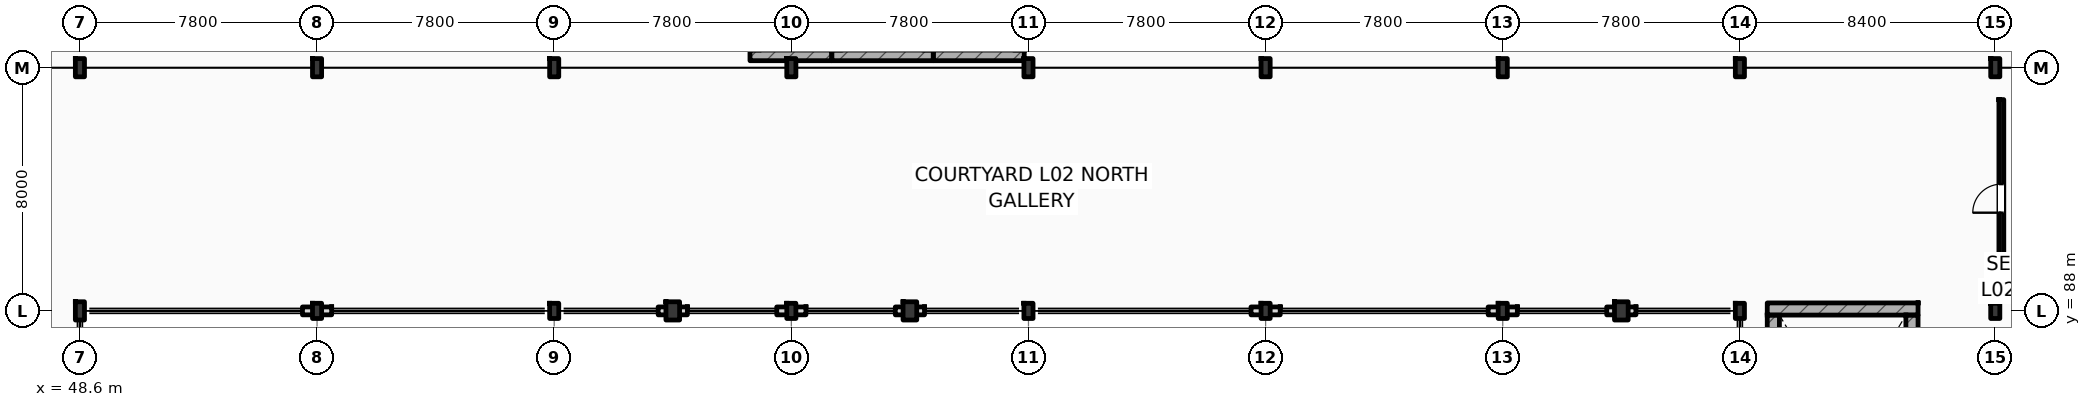
"""IFC4 building model, lengths in metres.
Left out: names, types, materials, properties, quantities, classifications, styles, units other than length and angle.
Written with IfcOpenShell. Run it as: python <this file> out.ifc"""

import sys

from ifc_helpers import new_model, si_unit, direction, frame, frame_2d, origin, origin_2d, place, context, subcontext, project, spatial, rectangle, i_section, extrude, element, fill, save


model = new_model("IFC4")
c1 = context("Model", 3, precision=1e-05, world=origin(), true_north=direction((0.0, 1.0)))
c2 = subcontext(c1, "Body", "Model", "MODEL_VIEW")
j1 = project(units=[si_unit("LENGTHUNIT", "METRE"), si_unit("PLANEANGLEUNIT", "RADIAN")], contexts=[c1])
p1 = place(None, origin())
s1 = spatial("IfcSite", under=j1, at=p1, CompositionType="ELEMENT")
p2 = place(p1, origin())
s2 = spatial("IfcBuilding", under=s1, at=p2, CompositionType="ELEMENT")
p3 = place(p2, frame((0.0, 0.0, 11.4)))
s3 = spatial("IfcBuildingStorey", under=s2, at=p3, CompositionType="ELEMENT", Elevation=11.4)
for number, where, z_axis, x_axis in (
    (1, (48.6, 96.0, 0.0), (0.0, 0.0, 1.0), (1.0, 0.0, 0.0)),
    (2, (56.4, 96.0, 0.0), (0.0, 0.0, 1.0), (1.0, 0.0, 0.0)),
    (3, (64.2, 96.0, 0.0), (0.0, 0.0, 1.0), (1.0, 0.0, 0.0)),
    (4, (72.0, 96.0, 0.0), (0.0, 0.0, 1.0), (1.0, 0.0, 0.0)),
    (5, (79.8, 96.0, 0.0), (0.0, 0.0, 1.0), (1.0, 0.0, 0.0)),
    (6, (87.6, 96.0, 0.0), (0.0, 0.0, 1.0), (1.0, 0.0, 0.0)),
    (7, (95.4, 96.0, 0.0), (0.0, 0.0, 1.0), (1.0, 0.0, 0.0)),
    (8, (103.2, 96.0, 0.0), (0.0, 0.0, 1.0), (1.0, 0.0, 0.0)),
    (9, (111.6, 96.0, 0.0), (0.0, 0.0, 1.0), (1.0, 0.0, 0.0)),
    (10, (48.6, 88.0, 0.0), (0.0, 0.0, 1.0), (1.0, 0.0, 0.0)),
):
    element("IfcColumn", number, at=place(p3, frame(where, z_axis=z_axis, x_axis=x_axis)), inside=s3, PredefinedType="COLUMN", context=c2, shape_type="SweptSolid", body=[
        extrude(i_section(OverallWidth=0.3, OverallDepth=0.6, WebThickness=0.015, FlangeThickness=0.03, FilletRadius=0.027, at=origin_2d()), origin(), (0.0, 0.0, 1.0), 4.8),
    ])
for number, where, z_axis, x_axis in (
    (11, (56.4, 88.0, 0.0), (0.0, 0.0, 1.0), (1.0, 0.0, 0.0)),
    (12, (64.2, 88.0, 0.0), (0.0, 0.0, 1.0), (1.0, 0.0, 0.0)),
    (13, (72.0, 88.0, 0.0), (0.0, 0.0, 1.0), (1.0, 0.0, 0.0)),
    (14, (79.8, 88.0, 0.0), (0.0, 0.0, 1.0), (1.0, 0.0, 0.0)),
    (15, (87.6, 88.0, 0.0), (0.0, 0.0, 1.0), (1.0, 0.0, 0.0)),
    (16, (95.4, 88.0, 0.0), (0.0, 0.0, 1.0), (1.0, 0.0, 0.0)),
    (17, (103.2, 88.0, 0.0), (0.0, 0.0, 1.0), (1.0, 0.0, 0.0)),
    (18, (111.6, 88.0, 0.0), (0.0, 0.0, 1.0), (1.0, 0.0, 0.0)),
):
    element("IfcColumn", number, at=place(p3, frame(where, z_axis=z_axis, x_axis=x_axis)), inside=s3, PredefinedType="COLUMN", context=c2, shape_type="SweptSolid", body=[
        extrude(i_section(OverallWidth=0.3, OverallDepth=0.5, WebThickness=0.014, FlangeThickness=0.028, FilletRadius=0.027, at=origin_2d()), origin(), (0.0, 0.0, 1.0), 4.8),
    ])
for number, where, z_axis, x_axis in (
    (19, (68.1, 88.0, 0.0), (0.0, 0.0, 1.0), (1.0, 0.0, 0.0)),
    (20, (75.9, 88.0, 0.0), (0.0, 0.0, 1.0), (1.0, 0.0, 0.0)),
    (21, (99.3, 88.0, 0.0), (0.0, 0.0, 1.0), (1.0, 0.0, 0.0)),
):
    element("IfcColumn", number, at=place(p3, frame(where, z_axis=z_axis, x_axis=x_axis)), inside=s3, PredefinedType="PILASTER", context=c2, shape_type="SweptSolid", body=[
        extrude(rectangle(XDim=0.45, YDim=0.6, at=origin_2d()), origin(), (0.0, 0.0, 1.0), 4.8),
    ])
p4 = place(p3, frame((104.1, 88.062, 0.0), z_axis=(0.0, 0.0, 1.0), x_axis=(1.0, 0.0, 0.0)))
e22 = element("IfcWall", 22, at=p4, inside=s3, PredefinedType="SHEAR", context=c2, shape_type="SweptSolid", body=[
    extrude(rectangle(XDim=4.96, YDim=0.4, at=frame_2d((2.48, 0.0))), origin(), (0.0, 0.0, 1.0), 4.8),
])
p5 = place(p3, frame((104.3, 78.75, 0.0), z_axis=(0.0, 0.0, 1.0), x_axis=(0.0, 1.0, 0.0)))
e23 = element("IfcWall", 23, at=p5, inside=s3, PredefinedType="SHEAR", context=c2, shape_type="SweptSolid", body=[
    extrude(rectangle(XDim=9.112, YDim=0.4, at=frame_2d((4.556, 0.0))), origin(), (0.0, 0.0, 1.0), 4.8),
])
p6 = place(p3, frame((108.86, 78.75, 0.0), z_axis=(0.0, 0.0, 1.0), x_axis=(0.0, 1.0, 0.0)))
e24 = element("IfcWall", 24, at=p6, inside=s3, PredefinedType="SHEAR", context=c2, shape_type="SweptSolid", body=[
    extrude(rectangle(XDim=9.112, YDim=0.4, at=frame_2d((4.556, 0.0))), origin(), (0.0, 0.0, 1.0), 4.8),
])
p7 = place(p6, frame((0.44, 0.0, 0.0)))
e25 = element("IfcOpeningElement", 25, at=p7, cuts=e24, PredefinedType="OPENING", context=c2, shape_type="SweptSolid", body=[
    extrude(rectangle(XDim=1.1, YDim=2.2, at=frame_2d((0.55, 1.1))), frame((0.0, 0.21, 0.0), z_axis=(0.0, -1.0, 0.0), x_axis=(1.0, 0.0, 0.0)), (0.0, 0.0, 1.0), 0.42),
])
for number, where, z_axis, x_axis in (
    (26, (55.92, 88.0, 0.0), (0.0, 0.0, 1.0), (1.0, 0.0, 0.0)),
    (27, (67.62, 88.0, 0.0), (0.0, 0.0, 1.0), (1.0, 0.0, 0.0)),
    (28, (71.52, 88.0, 0.0), (0.0, 0.0, 1.0), (1.0, 0.0, 0.0)),
    (29, (75.42, 88.0, 0.0), (0.0, 0.0, 1.0), (1.0, 0.0, 0.0)),
    (30, (87.12, 88.0, 0.0), (0.0, 0.0, 1.0), (1.0, 0.0, 0.0)),
    (31, (94.92, 88.0, 0.0), (0.0, 0.0, 1.0), (1.0, 0.0, 0.0)),
    (32, (98.82, 88.0, 0.0), (0.0, 0.0, 1.0), (1.0, 0.0, 0.0)),
):
    element("IfcWall", number, at=place(p3, frame(where, z_axis=z_axis, x_axis=x_axis)), inside=s3, PredefinedType="STANDARD", context=c2, shape_type="SweptSolid", body=[
        extrude(rectangle(XDim=0.96, YDim=0.26, at=frame_2d((0.48, 0.0))), origin(), (0.0, 0.0, 1.0), 4.06),
    ])
p8 = place(p3, frame((70.64, 96.405, 0.0), z_axis=(0.0, 0.0, 1.0), x_axis=(1.0, 0.0, 0.0)))
e33 = element("IfcWall", 33, at=p8, inside=s3, PredefinedType="SHEAR", context=c2, shape_type="SweptSolid", body=[
    extrude(rectangle(XDim=2.69, YDim=0.35, at=frame_2d((1.345, 0.0))), origin(), (0.0, 0.0, 1.0), 4.52),
])
p9 = place(p3, frame((73.33, 96.405, 0.0), z_axis=(0.0, 0.0, 1.0), x_axis=(1.0, 0.0, 0.0)))
e34 = element("IfcWall", 34, at=p9, inside=s3, PredefinedType="SHEAR", context=c2, shape_type="SweptSolid", body=[
    extrude(rectangle(XDim=3.34, YDim=0.35, at=frame_2d((1.67, 0.0))), origin(), (0.0, 0.0, 1.0), 4.52),
])
p10 = place(p3, frame((76.67, 96.405, 0.0), z_axis=(0.0, 0.0, 1.0), x_axis=(1.0, 0.0, 0.0)))
e35 = element("IfcWall", 35, at=p10, inside=s3, PredefinedType="SHEAR", context=c2, shape_type="SweptSolid", body=[
    extrude(rectangle(XDim=2.99, YDim=0.35, at=frame_2d((1.495, 0.0))), origin(), (0.0, 0.0, 1.0), 4.52),
])
p11 = place(p3, frame((111.8, 88.45, 0.0), z_axis=(0.0, 0.0, 1.0), x_axis=(0.0, 1.0, 0.0)))
e36 = element("IfcWall", 36, at=p11, inside=s3, PredefinedType="PARTITIONING", context=c2, shape_type="SweptSolid", body=[
    extrude(rectangle(XDim=6.5, YDim=0.16, at=frame_2d((3.25, 0.0))), origin(), (0.0, 0.0, 1.0), 4.11),
])
p12 = place(p11, frame((2.78, 0.0, 0.0)))
e37 = element("IfcOpeningElement", 37, at=p12, cuts=e36, PredefinedType="OPENING", context=c2, shape_type="SweptSolid", body=[
    extrude(rectangle(XDim=0.94, YDim=2.15, at=frame_2d((0.47, 1.075))), frame((0.0, 0.09, 0.0), z_axis=(0.0, -1.0, 0.0), x_axis=(1.0, 0.0, 0.0)), (0.0, 0.0, 1.0), 0.18),
])
p13 = place(p12, origin())
e38 = element("IfcDoor", 38, at=p13, inside=s3, OperationType="SINGLE_SWING_LEFT", PredefinedType="DOOR", context=c2, shape_type="SweptSolid", body=[
    extrude(rectangle(XDim=0.94, YDim=2.15, at=frame_2d((0.47, 1.075))), frame((0.0, 0.025, 0.0), z_axis=(0.0, -1.0, 0.0), x_axis=(1.0, 0.0, 0.0)), (0.0, 0.0, 1.0), 0.05),
])
fill(e37, e38)
save(model, sys.argv[1])
